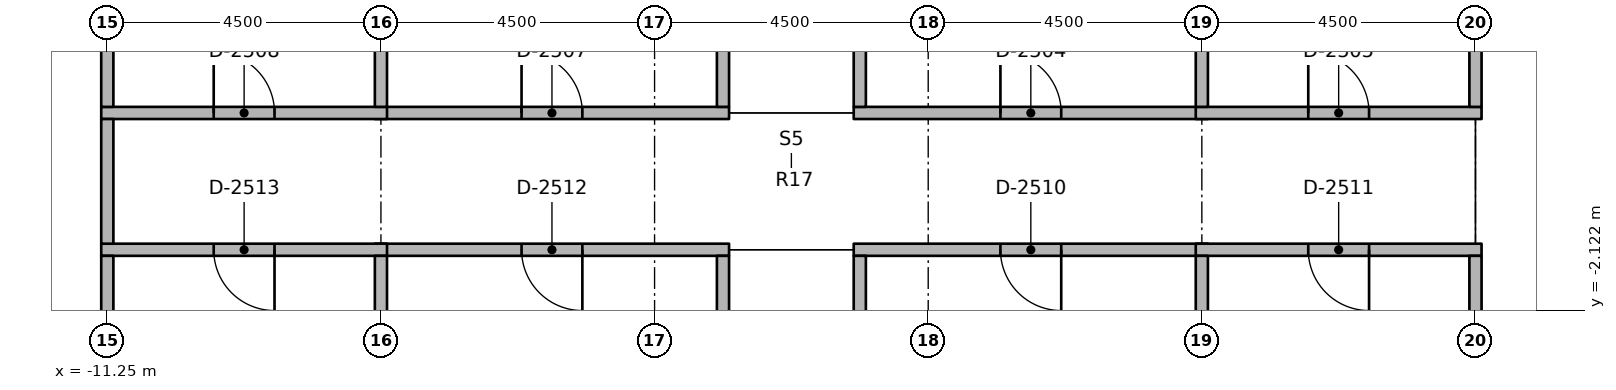
"""IFC4 building model, lengths in metres.
Left out: names, types, materials, properties, quantities, classifications, styles, units other than length and angle.
Written with IfcOpenShell. Run it as: python <this file> out.ifc"""

import sys

from ifc_helpers import new_model, si_unit, direction, frame, frame_2d, origin, place, context, subcontext, project, spatial, rectangle, extrude, element, fill, save


model = new_model("IFC4")
c1 = context("Model", 3, precision=1e-05, world=origin(), true_north=direction((0.0, 1.0)))
c2 = subcontext(c1, "Body", "Model", "MODEL_VIEW")
j1 = project(units=[si_unit("LENGTHUNIT", "METRE"), si_unit("PLANEANGLEUNIT", "RADIAN")], contexts=[c1])
p1 = place(None, origin())
s1 = spatial("IfcSite", under=j1, at=p1, CompositionType="ELEMENT")
p2 = place(p1, origin())
s2 = spatial("IfcBuilding", under=s1, at=p2, CompositionType="ELEMENT")
p3 = place(p2, frame((0.0, 0.0, 233.4)))
s3 = spatial("IfcBuildingStorey", under=s2, at=p3, CompositionType="ELEMENT", Elevation=233.4)
p4 = place(p3, frame((1.025, 1.125, 0.0), z_axis=(0.0, 0.0, 1.0), x_axis=(1.0, 0.0, 0.0)))
e1 = element("IfcWall", 1, at=p4, inside=s3, PredefinedType="PARTITIONING", context=c2, shape_type="SweptSolid", body=[
    extrude(rectangle(XDim=5.825, YDim=0.2, at=frame_2d((2.913, 0.0))), origin(), (0.0, 0.0, 1.0), 2.746),
])
p5 = place(p4, frame((2.413, 0.0, 0.0)))
e2 = element("IfcOpeningElement", 2, at=p5, cuts=e1, PredefinedType="OPENING", context=c2, shape_type="SweptSolid", body=[
    extrude(rectangle(XDim=1.0, YDim=2.1, at=frame_2d((0.5, 1.05))), frame((0.0, 0.11, 0.0), z_axis=(0.0, -1.0, 0.0), x_axis=(1.0, 0.0, 0.0)), (0.0, 0.0, 1.0), 0.22),
])
p6 = place(p3, frame((6.65, 1.125, 0.0), z_axis=(0.0, 0.0, 1.0), x_axis=(1.0, 0.0, 0.0)))
e3 = element("IfcWall", 3, at=p6, inside=s3, PredefinedType="PARTITIONING", context=c2, shape_type="SweptSolid", body=[
    extrude(rectangle(XDim=4.7, YDim=0.2, at=frame_2d((2.35, 0.0))), origin(), (0.0, 0.0, 1.0), 2.746),
])
p7 = place(p6, frame((1.85, 0.0, 0.0)))
e4 = element("IfcOpeningElement", 4, at=p7, cuts=e3, PredefinedType="OPENING", context=c2, shape_type="SweptSolid", body=[
    extrude(rectangle(XDim=1.0, YDim=2.1, at=frame_2d((0.5, 1.05))), frame((0.0, 0.11, 0.0), z_axis=(0.0, -1.0, 0.0), x_axis=(1.0, 0.0, 0.0)), (0.0, 0.0, 1.0), 0.22),
])
p8 = place(p3, frame((-6.85, 1.125, 0.0), z_axis=(0.0, 0.0, 1.0), x_axis=(1.0, 0.0, 0.0)))
e5 = element("IfcWall", 5, at=p8, inside=s3, PredefinedType="PARTITIONING", context=c2, shape_type="SweptSolid", body=[
    extrude(rectangle(XDim=5.825, YDim=0.2, at=frame_2d((2.913, 0.0))), origin(), (0.0, 0.0, 1.0), 2.746),
])
p9 = place(p8, frame((2.413, 0.0, 0.0)))
e6 = element("IfcOpeningElement", 6, at=p9, cuts=e5, PredefinedType="OPENING", context=c2, shape_type="SweptSolid", body=[
    extrude(rectangle(XDim=1.0, YDim=2.1, at=frame_2d((0.5, 1.05))), frame((0.0, 0.11, 0.0), z_axis=(0.0, -1.0, 0.0), x_axis=(1.0, 0.0, 0.0)), (0.0, 0.0, 1.0), 0.22),
])
p10 = place(p3, frame((-11.35, 1.125, 0.0), z_axis=(0.0, 0.0, 1.0), x_axis=(1.0, 0.0, 0.0)))
e7 = element("IfcWall", 7, at=p10, inside=s3, PredefinedType="PARTITIONING", context=c2, shape_type="SweptSolid", body=[
    extrude(rectangle(XDim=4.7, YDim=0.2, at=frame_2d((2.35, 0.0))), origin(), (0.0, 0.0, 1.0), 2.746),
])
p11 = place(p10, frame((1.85, 0.0, 0.0)))
e8 = element("IfcOpeningElement", 8, at=p11, cuts=e7, PredefinedType="OPENING", context=c2, shape_type="SweptSolid", body=[
    extrude(rectangle(XDim=1.0, YDim=2.1, at=frame_2d((0.5, 1.05))), frame((0.0, 0.11, 0.0), z_axis=(0.0, -1.0, 0.0), x_axis=(1.0, 0.0, 0.0)), (0.0, 0.0, 1.0), 0.22),
])
p12 = place(p3, frame((6.85, -1.125, 0.0), z_axis=(0.0, 0.0, 1.0), x_axis=(-1.0, 0.0, 0.0)))
e9 = element("IfcWall", 9, at=p12, inside=s3, PredefinedType="PARTITIONING", context=c2, shape_type="SweptSolid", body=[
    extrude(rectangle(XDim=5.825, YDim=0.2, at=frame_2d((2.913, 0.0))), origin(), (0.0, 0.0, 1.0), 2.746),
])
p13 = place(p12, frame((2.413, 0.0, 0.0)))
e10 = element("IfcOpeningElement", 10, at=p13, cuts=e9, PredefinedType="OPENING", context=c2, shape_type="SweptSolid", body=[
    extrude(rectangle(XDim=1.0, YDim=2.1, at=frame_2d((0.5, 1.05))), frame((0.0, 0.11, 0.0), z_axis=(0.0, -1.0, 0.0), x_axis=(1.0, 0.0, 0.0)), (0.0, 0.0, 1.0), 0.22),
])
p14 = place(p3, frame((11.35, -1.125, 0.0), z_axis=(0.0, 0.0, 1.0), x_axis=(-1.0, 0.0, 0.0)))
e11 = element("IfcWall", 11, at=p14, inside=s3, PredefinedType="PARTITIONING", context=c2, shape_type="SweptSolid", body=[
    extrude(rectangle(XDim=4.7, YDim=0.2, at=frame_2d((2.35, 0.0))), origin(), (0.0, 0.0, 1.0), 2.746),
])
p15 = place(p14, frame((1.85, 0.0, 0.0)))
e12 = element("IfcOpeningElement", 12, at=p15, cuts=e11, PredefinedType="OPENING", context=c2, shape_type="SweptSolid", body=[
    extrude(rectangle(XDim=1.0, YDim=2.1, at=frame_2d((0.5, 1.05))), frame((0.0, 0.11, 0.0), z_axis=(0.0, -1.0, 0.0), x_axis=(1.0, 0.0, 0.0)), (0.0, 0.0, 1.0), 0.22),
])
p16 = place(p3, frame((-1.025, -1.125, 0.0), z_axis=(0.0, 0.0, 1.0), x_axis=(-1.0, 0.0, 0.0)))
e13 = element("IfcWall", 13, at=p16, inside=s3, PredefinedType="PARTITIONING", context=c2, shape_type="SweptSolid", body=[
    extrude(rectangle(XDim=5.825, YDim=0.2, at=frame_2d((2.913, 0.0))), origin(), (0.0, 0.0, 1.0), 2.746),
])
p17 = place(p16, frame((2.413, 0.0, 0.0)))
e14 = element("IfcOpeningElement", 14, at=p17, cuts=e13, PredefinedType="OPENING", context=c2, shape_type="SweptSolid", body=[
    extrude(rectangle(XDim=1.0, YDim=2.1, at=frame_2d((0.5, 1.05))), frame((0.0, 0.11, 0.0), z_axis=(0.0, -1.0, 0.0), x_axis=(1.0, 0.0, 0.0)), (0.0, 0.0, 1.0), 0.22),
])
p18 = place(p3, frame((-6.65, -1.125, 0.0), z_axis=(0.0, 0.0, 1.0), x_axis=(-1.0, 0.0, 0.0)))
e15 = element("IfcWall", 15, at=p18, inside=s3, PredefinedType="PARTITIONING", context=c2, shape_type="SweptSolid", body=[
    extrude(rectangle(XDim=4.7, YDim=0.2, at=frame_2d((2.35, 0.0))), origin(), (0.0, 0.0, 1.0), 2.746),
])
p19 = place(p18, frame((1.85, 0.0, 0.0)))
e16 = element("IfcOpeningElement", 16, at=p19, cuts=e15, PredefinedType="OPENING", context=c2, shape_type="SweptSolid", body=[
    extrude(rectangle(XDim=1.0, YDim=2.1, at=frame_2d((0.5, 1.05))), frame((0.0, 0.11, 0.0), z_axis=(0.0, -1.0, 0.0), x_axis=(1.0, 0.0, 0.0)), (0.0, 0.0, 1.0), 0.22),
])
p20 = place(p3, frame((-11.25, -1.025, 0.0), z_axis=(0.0, 0.0, 1.0), x_axis=(0.0, 1.0, 0.0)))
e17 = element("IfcWall", 17, at=p20, inside=s3, PredefinedType="PARTITIONING", context=c2, shape_type="SweptSolid", body=[
    extrude(rectangle(XDim=2.05, YDim=0.2, at=frame_2d((1.025, 0.0))), origin(), (0.0, 0.0, 1.0), 2.746),
])
for number, where, z_axis, x_axis in (
    (18, (1.125, 1.225, 0.0), (0.0, 0.0, 1.0), (0.0, 1.0, 0.0)),
    (19, (-1.125, 1.225, 0.0), (0.0, 0.0, 1.0), (0.0, 1.0, 0.0)),
    (20, (1.125, -6.65, 0.0), (0.0, 0.0, 1.0), (0.0, 1.0, 0.0)),
    (21, (-1.125, -6.65, 0.0), (0.0, 0.0, 1.0), (0.0, 1.0, 0.0)),
    (22, (6.75, 1.225, 0.0), (0.0, 0.0, 1.0), (0.0, 1.0, 0.0)),
):
    element("IfcWall", number, at=place(p3, frame(where, z_axis=z_axis, x_axis=x_axis)), inside=s3, PredefinedType="PARTITIONING", context=c2, shape_type="SweptSolid", body=[
        extrude(rectangle(XDim=5.425, YDim=0.2, at=frame_2d((2.712, 0.0))), origin(), (0.0, 0.0, 1.0), 2.746),
    ])
p21 = place(p3, frame((11.25, 1.225, 0.0), z_axis=(0.0, 0.0, 1.0), x_axis=(0.0, 1.0, 0.0)))
e23 = element("IfcWall", 23, at=p21, inside=s3, PredefinedType="PARTITIONING", context=c2, shape_type="SweptSolid", body=[
    extrude(rectangle(XDim=0.925, YDim=0.2, at=frame_2d((0.462, 0.0))), origin(), (0.0, 0.0, 1.0), 2.746),
])
p22 = place(p3, frame((-6.75, 1.225, 0.0), z_axis=(0.0, 0.0, 1.0), x_axis=(0.0, 1.0, 0.0)))
e24 = element("IfcWall", 24, at=p22, inside=s3, PredefinedType="PARTITIONING", context=c2, shape_type="SweptSolid", body=[
    extrude(rectangle(XDim=5.425, YDim=0.2, at=frame_2d((2.712, 0.0))), origin(), (0.0, 0.0, 1.0), 2.746),
])
p23 = place(p3, frame((-11.25, 1.225, 0.0), z_axis=(0.0, 0.0, 1.0), x_axis=(0.0, 1.0, 0.0)))
e25 = element("IfcWall", 25, at=p23, inside=s3, PredefinedType="PARTITIONING", context=c2, shape_type="SweptSolid", body=[
    extrude(rectangle(XDim=5.425, YDim=0.2, at=frame_2d((2.712, 0.0))), origin(), (0.0, 0.0, 1.0), 2.746),
])
p24 = place(p23, frame((1.812, 0.0, 0.0)))
e26 = element("IfcOpeningElement", 26, at=p24, cuts=e25, PredefinedType="OPENING", context=c2, shape_type="SweptSolid", body=[
    extrude(rectangle(XDim=1.8, YDim=2.1, at=frame_2d((0.9, 1.05))), frame((0.0, 0.11, 0.0), z_axis=(0.0, -1.0, 0.0), x_axis=(1.0, 0.0, 0.0)), (0.0, 0.0, 1.0), 0.22),
])
p25 = place(p3, frame((6.75, -6.65, 0.0), z_axis=(0.0, 0.0, 1.0), x_axis=(0.0, 1.0, 0.0)))
e27 = element("IfcWall", 27, at=p25, inside=s3, PredefinedType="PARTITIONING", context=c2, shape_type="SweptSolid", body=[
    extrude(rectangle(XDim=5.425, YDim=0.2, at=frame_2d((2.712, 0.0))), origin(), (0.0, 0.0, 1.0), 2.746),
])
p26 = place(p3, frame((11.25, -2.15, 0.0), z_axis=(0.0, 0.0, 1.0), x_axis=(0.0, 1.0, 0.0)))
e28 = element("IfcWall", 28, at=p26, inside=s3, PredefinedType="PARTITIONING", context=c2, shape_type="SweptSolid", body=[
    extrude(rectangle(XDim=0.925, YDim=0.2, at=frame_2d((0.462, 0.0))), origin(), (0.0, 0.0, 1.0), 2.746),
])
for number, where, z_axis, x_axis in (
    (29, (-6.75, -6.65, 0.0), (0.0, 0.0, 1.0), (0.0, 1.0, 0.0)),
    (30, (-11.25, -6.65, 0.0), (0.0, 0.0, 1.0), (0.0, 1.0, 0.0)),
):
    element("IfcWall", number, at=place(p3, frame(where, z_axis=z_axis, x_axis=x_axis)), inside=s3, PredefinedType="PARTITIONING", context=c2, shape_type="SweptSolid", body=[
        extrude(rectangle(XDim=5.425, YDim=0.2, at=frame_2d((2.712, 0.0))), origin(), (0.0, 0.0, 1.0), 2.746),
    ])
p27 = place(p5, origin())
e31 = element("IfcDoor", 31, at=p27, inside=s3, OperationType="SINGLE_SWING_RIGHT", PredefinedType="DOOR", context=c2, shape_type="SweptSolid", body=[
    extrude(rectangle(XDim=1.0, YDim=2.1, at=frame_2d((0.5, 1.05))), frame((0.0, 0.025, 0.0), z_axis=(0.0, -1.0, 0.0), x_axis=(1.0, 0.0, 0.0)), (0.0, 0.0, 1.0), 0.05),
])
fill(e2, e31)
p28 = place(p7, origin())
e32 = element("IfcDoor", 32, at=p28, inside=s3, OperationType="SINGLE_SWING_RIGHT", PredefinedType="DOOR", context=c2, shape_type="SweptSolid", body=[
    extrude(rectangle(XDim=1.0, YDim=2.1, at=frame_2d((0.5, 1.05))), frame((0.0, 0.025, 0.0), z_axis=(0.0, -1.0, 0.0), x_axis=(1.0, 0.0, 0.0)), (0.0, 0.0, 1.0), 0.05),
])
fill(e4, e32)
p29 = place(p9, origin())
e33 = element("IfcDoor", 33, at=p29, inside=s3, OperationType="SINGLE_SWING_RIGHT", PredefinedType="DOOR", context=c2, shape_type="SweptSolid", body=[
    extrude(rectangle(XDim=1.0, YDim=2.1, at=frame_2d((0.5, 1.05))), frame((0.0, 0.025, 0.0), z_axis=(0.0, -1.0, 0.0), x_axis=(1.0, 0.0, 0.0)), (0.0, 0.0, 1.0), 0.05),
])
fill(e6, e33)
p30 = place(p11, origin())
e34 = element("IfcDoor", 34, at=p30, inside=s3, OperationType="SINGLE_SWING_RIGHT", PredefinedType="DOOR", context=c2, shape_type="SweptSolid", body=[
    extrude(rectangle(XDim=1.0, YDim=2.1, at=frame_2d((0.5, 1.05))), frame((0.0, 0.025, 0.0), z_axis=(0.0, -1.0, 0.0), x_axis=(1.0, 0.0, 0.0)), (0.0, 0.0, 1.0), 0.05),
])
fill(e8, e34)
p31 = place(p13, origin())
e35 = element("IfcDoor", 35, at=p31, inside=s3, OperationType="SINGLE_SWING_RIGHT", PredefinedType="DOOR", context=c2, shape_type="SweptSolid", body=[
    extrude(rectangle(XDim=1.0, YDim=2.1, at=frame_2d((0.5, 1.05))), frame((0.0, 0.025, 0.0), z_axis=(0.0, -1.0, 0.0), x_axis=(1.0, 0.0, 0.0)), (0.0, 0.0, 1.0), 0.05),
])
fill(e10, e35)
p32 = place(p15, origin())
e36 = element("IfcDoor", 36, at=p32, inside=s3, OperationType="SINGLE_SWING_RIGHT", PredefinedType="DOOR", context=c2, shape_type="SweptSolid", body=[
    extrude(rectangle(XDim=1.0, YDim=2.1, at=frame_2d((0.5, 1.05))), frame((0.0, 0.025, 0.0), z_axis=(0.0, -1.0, 0.0), x_axis=(1.0, 0.0, 0.0)), (0.0, 0.0, 1.0), 0.05),
])
fill(e12, e36)
p33 = place(p17, origin())
e37 = element("IfcDoor", 37, at=p33, inside=s3, OperationType="SINGLE_SWING_RIGHT", PredefinedType="DOOR", context=c2, shape_type="SweptSolid", body=[
    extrude(rectangle(XDim=1.0, YDim=2.1, at=frame_2d((0.5, 1.05))), frame((0.0, 0.025, 0.0), z_axis=(0.0, -1.0, 0.0), x_axis=(1.0, 0.0, 0.0)), (0.0, 0.0, 1.0), 0.05),
])
fill(e14, e37)
p34 = place(p19, origin())
e38 = element("IfcDoor", 38, at=p34, inside=s3, OperationType="SINGLE_SWING_RIGHT", PredefinedType="DOOR", context=c2, shape_type="SweptSolid", body=[
    extrude(rectangle(XDim=1.0, YDim=2.1, at=frame_2d((0.5, 1.05))), frame((0.0, 0.025, 0.0), z_axis=(0.0, -1.0, 0.0), x_axis=(1.0, 0.0, 0.0)), (0.0, 0.0, 1.0), 0.05),
])
fill(e16, e38)
save(model, sys.argv[1])
